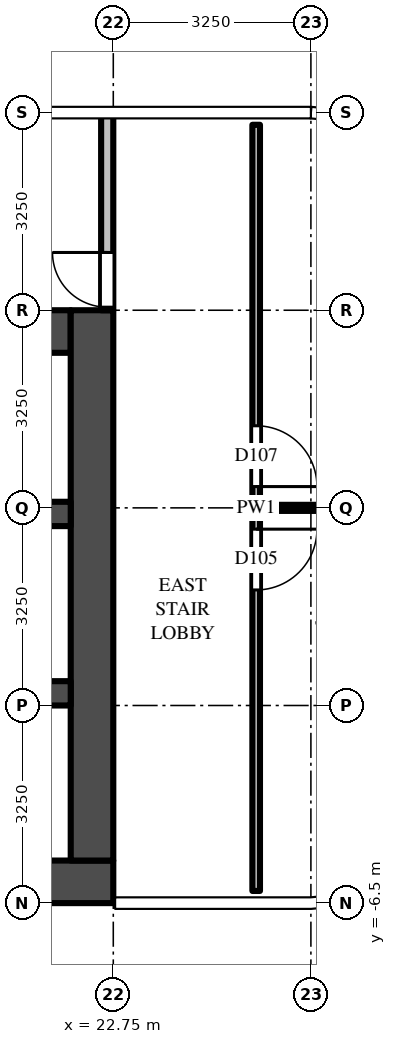
"""IFC4 building model, lengths in metres.
Left out: names, types, materials, properties, quantities, classifications, styles, units other than length and angle.
Written with IfcOpenShell. Run it as: python <this file> out.ifc"""

import sys

from ifc_helpers import new_model, si_unit, direction, frame, frame_2d, origin, place, context, subcontext, project, spatial, rectangle, extrude, source, transform, mapped, element, fill, save


model = new_model("IFC4")
c1 = context("Model", 3, precision=1e-05, world=origin(), true_north=direction((0.0, 1.0)))
c2 = subcontext(c1, "Body", "Model", "MODEL_VIEW")
j1 = project(units=[si_unit("LENGTHUNIT", "METRE"), si_unit("PLANEANGLEUNIT", "RADIAN")], contexts=[c1])
p1 = place(None, origin())
s1 = spatial("IfcSite", under=j1, at=p1, CompositionType="ELEMENT")
p2 = place(p1, origin())
s2 = spatial("IfcBuilding", under=s1, at=p2, CompositionType="ELEMENT")
p3 = place(p2, frame((0.0, 0.0, 193.2)))
s3 = spatial("IfcBuildingStorey", under=s2, at=p3, CompositionType="ELEMENT", Elevation=193.2)
m1 = source(origin(), c2, "Body", "SweptSolid", [
    extrude(rectangle(XDim=16.55, YDim=0.7, at=frame_2d((8.275, 0.0))), origin(), (0.0, 0.0, 1.0), 3.7),
])
p4 = place(p3, frame((6.2, -6.15, 0.0), z_axis=(0.0, 0.0, 1.0), x_axis=(1.0, 0.0, 0.0)))
e1 = element("IfcWall", 1, at=p4, inside=s3, PredefinedType="SHEAR", context=c2, shape_type="MappedRepresentation", body=[
    mapped(m1, transform((0.0, 0.0, 0.0))),
])
m2 = source(origin(), c2, "Body", "SweptSolid", [
    extrude(rectangle(XDim=14.85, YDim=0.7, at=frame_2d((7.425, 0.0))), origin(), (0.0, 0.0, 1.0), 3.7),
])
p5 = place(p3, frame((7.2, 2.9, 0.0), z_axis=(0.0, 0.0, 1.0), x_axis=(1.0, 0.0, 0.0)))
e2 = element("IfcWall", 2, at=p5, inside=s3, PredefinedType="SHEAR", context=c2, shape_type="MappedRepresentation", body=[
    mapped(m2, transform((0.0, 0.0, 0.0))),
])
m3 = source(origin(), c2, "Body", "SweptSolid", [
    extrude(rectangle(XDim=1.1, YDim=2.1, at=frame_2d((0.55, 1.05))), frame((0.0, 0.36, 0.0), z_axis=(0.0, -1.0, 0.0), x_axis=(1.0, 0.0, 0.0)), (0.0, 0.0, 1.0), 0.72),
])
p6 = place(p5, frame((0.55, 0.0, 0.0)))
e3 = element("IfcOpeningElement", 3, at=p6, cuts=e2, PredefinedType="OPENING", context=c2, shape_type="MappedRepresentation", body=[
    mapped(m3, transform((0.0, 0.0, 0.0))),
])
p7 = place(p5, frame((3.15, 0.0, 0.0)))
e4 = element("IfcOpeningElement", 4, at=p7, cuts=e2, PredefinedType="OPENING", context=c2, shape_type="MappedRepresentation", body=[
    mapped(m3, transform((0.0, 0.0, 0.0))),
])
m4 = source(origin(), c2, "Body", "SweptSolid", [
    extrude(rectangle(XDim=1.2, YDim=2.1, at=frame_2d((0.6, 1.05))), frame((0.0, 0.36, 0.0), z_axis=(0.0, -1.0, 0.0), x_axis=(1.0, 0.0, 0.0)), (0.0, 0.0, 1.0), 0.72),
])
p8 = place(p5, frame((5.7, 0.0, 0.0)))
e5 = element("IfcOpeningElement", 5, at=p8, cuts=e2, PredefinedType="OPENING", context=c2, shape_type="MappedRepresentation", body=[
    mapped(m4, transform((0.0, 0.0, 0.0))),
])
m5 = source(origin(), c2, "Body", "SweptSolid", [
    extrude(rectangle(XDim=1.3, YDim=2.1, at=frame_2d((0.65, 1.05))), frame((0.0, 0.36, 0.0), z_axis=(0.0, -1.0, 0.0), x_axis=(1.0, 0.0, 0.0)), (0.0, 0.0, 1.0), 0.72),
])
p9 = place(p5, frame((12.2, 0.0, 0.0)))
e6 = element("IfcOpeningElement", 6, at=p9, cuts=e2, PredefinedType="OPENING", context=c2, shape_type="MappedRepresentation", body=[
    mapped(m5, transform((0.0, 0.0, 0.0))),
])
p10 = place(p5, frame((9.85, 0.0, 0.0)))
e7 = element("IfcOpeningElement", 7, at=p10, cuts=e2, PredefinedType="OPENING", context=c2, shape_type="MappedRepresentation", body=[
    mapped(m4, transform((0.0, 0.0, 0.0))),
])
m6 = source(origin(), c2, "Body", "SweptSolid", [
    extrude(rectangle(XDim=1.0, YDim=2.1, at=frame_2d((0.5, 1.05))), frame((0.0, 0.36, 0.0), z_axis=(0.0, -1.0, 0.0), x_axis=(1.0, 0.0, 0.0)), (0.0, 0.0, 1.0), 0.72),
])
p11 = place(p5, frame((7.9, 0.0, 0.0)))
e8 = element("IfcOpeningElement", 8, at=p11, cuts=e2, PredefinedType="OPENING", context=c2, shape_type="MappedRepresentation", body=[
    mapped(m6, transform((0.0, 0.0, 0.0))),
])
m7 = source(origin(), c2, "Body", "SweptSolid", [
    extrude(rectangle(XDim=9.05, YDim=0.7, at=frame_2d((4.525, 0.0))), origin(), (0.0, 0.0, 1.0), 3.7),
])
p12 = place(p3, frame((22.4, -5.8, 0.0), z_axis=(0.0, 0.0, 1.0), x_axis=(0.0, 1.0, 0.0)))
e9 = element("IfcWall", 9, at=p12, inside=s3, PredefinedType="SHEAR", context=c2, shape_type="MappedRepresentation", body=[
    mapped(m7, transform((0.0, 0.0, 0.0))),
])
m8 = source(origin(), c2, "Body", "SweptSolid", [
    extrude(rectangle(XDim=14.85, YDim=0.4, at=frame_2d((7.425, 0.0))), origin(), (0.0, 0.0, 1.0), 3.7),
])
p13 = place(p3, frame((7.2, -0.1, 0.0), z_axis=(0.0, 0.0, 1.0), x_axis=(1.0, 0.0, 0.0)))
e10 = element("IfcWall", 10, at=p13, inside=s3, PredefinedType="SHEAR", context=c2, shape_type="MappedRepresentation", body=[
    mapped(m8, transform((0.0, 0.0, 0.0))),
])
m9 = source(origin(), c2, "Body", "SweptSolid", [
    extrude(rectangle(XDim=1.0, YDim=2.1, at=frame_2d((0.5, 1.05))), frame((0.0, 0.21, 0.0), z_axis=(0.0, -1.0, 0.0), x_axis=(1.0, 0.0, 0.0)), (0.0, 0.0, 1.0), 0.42),
])
p14 = place(p13, frame((7.9, 0.0, 0.0)))
e11 = element("IfcOpeningElement", 11, at=p14, cuts=e10, PredefinedType="OPENING", context=c2, shape_type="MappedRepresentation", body=[
    mapped(m9, transform((0.0, 0.0, 0.0))),
])
m10 = source(origin(), c2, "Body", "SweptSolid", [
    extrude(rectangle(XDim=5.7, YDim=0.4, at=frame_2d((2.85, 0.0))), origin(), (0.0, 0.0, 1.0), 3.7),
])
p15 = place(p3, frame((16.35, -3.05, 0.0), z_axis=(0.0, 0.0, 1.0), x_axis=(1.0, 0.0, 0.0)))
e12 = element("IfcWall", 12, at=p15, inside=s3, PredefinedType="SHEAR", context=c2, shape_type="MappedRepresentation", body=[
    mapped(m10, transform((0.0, 0.0, 0.0))),
])
m11 = source(origin(), c2, "Body", "SweptSolid", [
    extrude(rectangle(XDim=3.25, YDim=0.2, at=frame_2d((1.625, 0.0))), origin(), (0.0, 0.0, 1.0), 3.7),
])
p16 = place(p3, frame((22.65, 3.25, 0.0), z_axis=(0.0, 0.0, 1.0), x_axis=(0.0, 1.0, 0.0)))
e13 = element("IfcWall", 13, at=p16, inside=s3, PredefinedType="PARTITIONING", context=c2, shape_type="MappedRepresentation", body=[
    mapped(m11, transform((0.0, 0.0, 0.0))),
])
m12 = source(origin(), c2, "Body", "SweptSolid", [
    extrude(rectangle(XDim=0.9, YDim=2.1, at=frame_2d((0.45, 1.05))), frame((0.0, 0.11, 0.0), z_axis=(0.0, -1.0, 0.0), x_axis=(1.0, 0.0, 0.0)), (0.0, 0.0, 1.0), 0.22),
])
p17 = place(p16, frame((0.05, 0.0, 0.0)))
e14 = element("IfcOpeningElement", 14, at=p17, cuts=e13, PredefinedType="OPENING", context=c2, shape_type="MappedRepresentation", body=[
    mapped(m12, transform((0.0, 0.0, 0.0))),
])
m13 = source(origin(), c2, "Body", "SweptSolid", [
    extrude(rectangle(XDim=12.6, YDim=0.125, at=frame_2d((6.3, 0.0))), origin(), (0.0, 0.0, 1.0), 2.78),
])
p18 = place(p3, frame((25.1, 6.3, 0.0), z_axis=(0.0, 0.0, 1.0), x_axis=(0.0, -1.0, 0.0)))
e15 = element("IfcWall", 15, at=p18, inside=s3, PredefinedType="PARTITIONING", context=c2, shape_type="MappedRepresentation", body=[
    mapped(m13, transform((0.0, 0.0, 0.0))),
])
m14 = source(origin(), c2, "Body", "SweptSolid", [
    extrude(rectangle(XDim=1.0, YDim=2.1, at=frame_2d((0.5, 1.05))), frame((0.0, 0.073, 0.0), z_axis=(0.0, -1.0, 0.0), x_axis=(1.0, 0.0, 0.0)), (0.0, 0.0, 1.0), 0.145),
])
p19 = place(p18, frame((6.65, 0.0, 0.0)))
e16 = element("IfcOpeningElement", 16, at=p19, cuts=e15, PredefinedType="OPENING", context=c2, shape_type="MappedRepresentation", body=[
    mapped(m14, transform((0.0, 0.0, 0.0))),
])
p20 = place(p18, frame((4.95, 0.0, 0.0)))
e17 = element("IfcOpeningElement", 17, at=p20, cuts=e15, PredefinedType="OPENING", context=c2, shape_type="MappedRepresentation", body=[
    mapped(m14, transform((0.0, 0.0, 0.0))),
])
m15 = source(origin(), c2, "Body", "SweptSolid", [
    extrude(rectangle(XDim=3.887, YDim=0.1, at=frame_2d((1.944, 0.0))), origin(), (0.0, 0.0, 1.0), 2.78),
])
p21 = place(p3, frame((25.163, 0.0, 0.0), z_axis=(0.0, 0.0, 1.0), x_axis=(1.0, 0.0, 0.0)))
e18 = element("IfcWall", 18, at=p21, inside=s3, PredefinedType="PARTITIONING", context=c2, shape_type="MappedRepresentation", body=[
    mapped(m15, transform((0.0, 0.0, 0.0))),
])
m16 = source(origin(), c2, "Body", "SweptSolid", [
    extrude(rectangle(XDim=0.9, YDim=2.1, at=frame_2d((0.45, 1.05))), frame((0.0, 0.025, 0.0), z_axis=(0.0, -1.0, 0.0), x_axis=(1.0, 0.0, 0.0)), (0.0, 0.0, 1.0), 0.05),
])
p22 = place(p17, origin())
e19 = element("IfcDoor", 19, at=p22, inside=s3, OperationType="SINGLE_SWING_RIGHT", PredefinedType="DOOR", context=c2, shape_type="MappedRepresentation", body=[
    mapped(m16, transform((0.0, 0.0, 0.0))),
])
fill(e14, e19)
m17 = source(origin(), c2, "Body", "SweptSolid", [
    extrude(rectangle(XDim=1.0, YDim=2.1, at=frame_2d((0.5, 1.05))), frame((0.0, 0.025, 0.0), z_axis=(0.0, -1.0, 0.0), x_axis=(1.0, 0.0, 0.0)), (0.0, 0.0, 1.0), 0.05),
])
p23 = place(p19, origin())
e20 = element("IfcDoor", 20, at=p23, inside=s3, OperationType="SINGLE_SWING_LEFT", PredefinedType="DOOR", context=c2, shape_type="MappedRepresentation", body=[
    mapped(m17, transform((0.0, 0.0, 0.0))),
])
fill(e16, e20)
p24 = place(p20, origin())
e21 = element("IfcDoor", 21, at=p24, inside=s3, OperationType="SINGLE_SWING_RIGHT", PredefinedType="DOOR", context=c2, shape_type="MappedRepresentation", body=[
    mapped(m17, transform((0.0, 0.0, 0.0))),
])
fill(e17, e21)
save(model, sys.argv[1])
